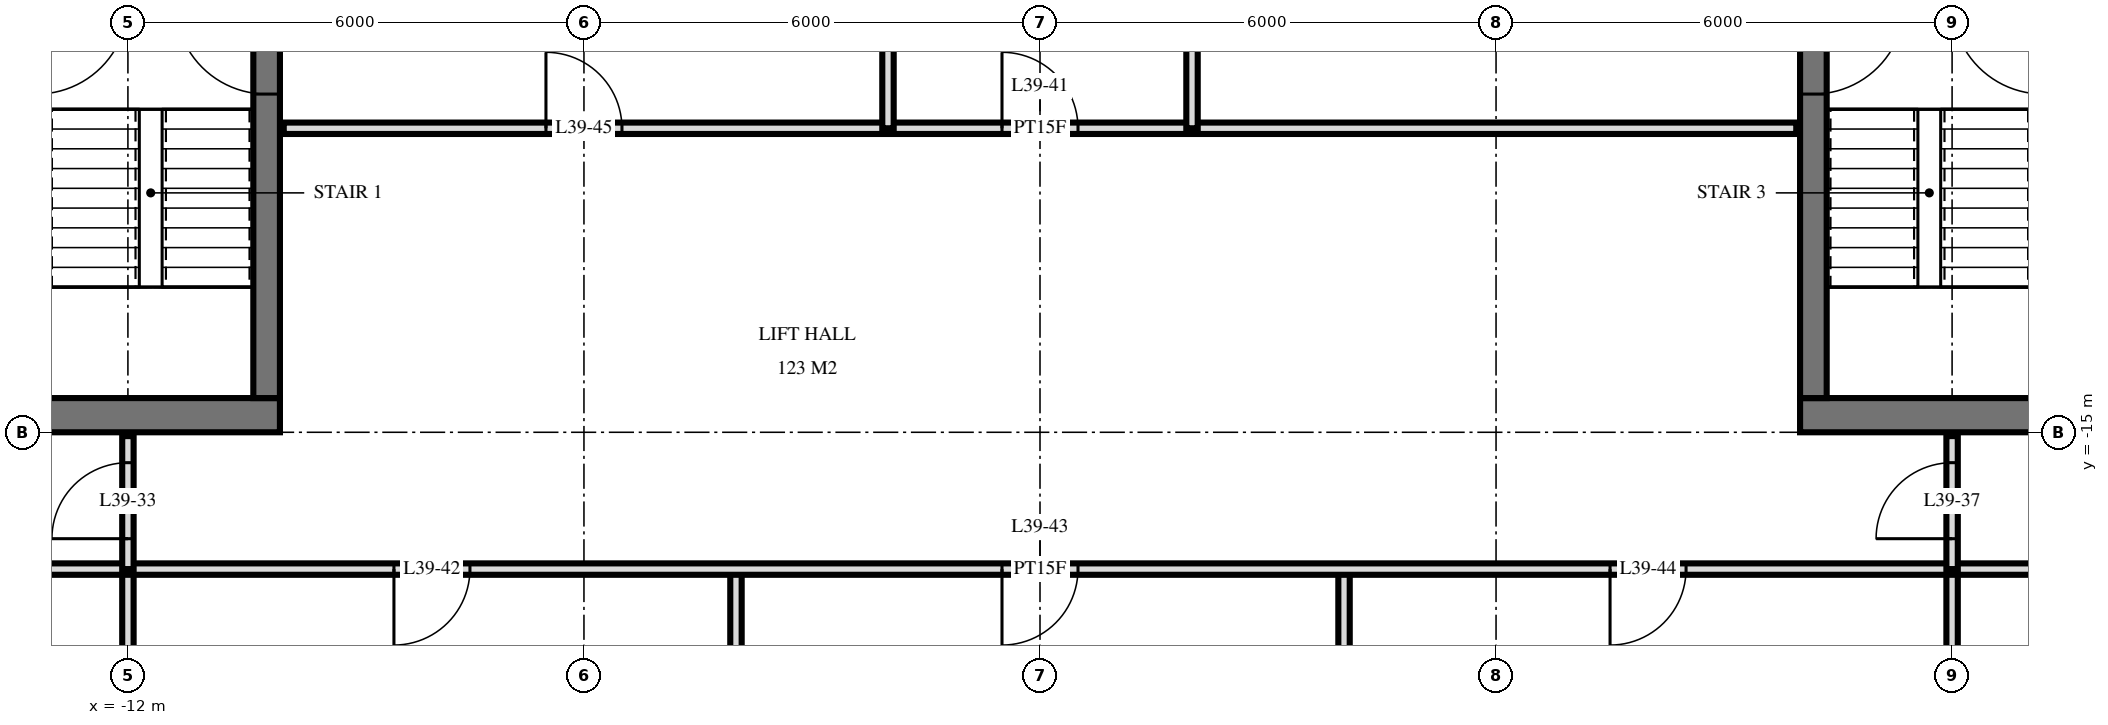
"""IFC4 building model, lengths in metres.
Left out: names, types, materials, properties, quantities, classifications, styles, units other than length and angle.
Written with IfcOpenShell. Run it as: python <this file> out.ifc"""

import sys

from ifc_helpers import new_model, si_unit, direction, frame, frame_2d, origin, place, context, subcontext, project, spatial, rectangle, extrude, element, fill, save


model = new_model("IFC4")
c1 = context("Model", 3, precision=1e-05, world=origin(), true_north=direction((0.0, 1.0)))
c2 = subcontext(c1, "Body", "Model", "MODEL_VIEW")
j1 = project(units=[si_unit("LENGTHUNIT", "METRE"), si_unit("PLANEANGLEUNIT", "RADIAN")], contexts=[c1])
p1 = place(None, origin())
s1 = spatial("IfcSite", under=j1, at=p1, CompositionType="ELEMENT")
p2 = place(p1, origin())
s2 = spatial("IfcBuilding", under=s1, at=p2, CompositionType="ELEMENT")
p3 = place(p2, frame((0.0, 0.0, 152.4)))
s3 = spatial("IfcBuildingStorey", under=s2, at=p3, CompositionType="ELEMENT", Elevation=152.4)
p4 = place(p3, frame((-24.5, -14.775, 0.0), z_axis=(0.0, 0.0, 1.0), x_axis=(1.0, 0.0, 0.0)))
e1 = element("IfcWall", 1, at=p4, inside=s3, PredefinedType="SHEAR", context=c2, shape_type="SweptSolid", body=[
    extrude(rectangle(XDim=14.5, YDim=0.45, at=frame_2d((7.25, 0.0))), origin(), (0.0, 0.0, 1.0), 3.6),
])
p5 = place(p4, frame((6.2, 0.0, 0.0)))
e2 = element("IfcOpeningElement", 2, at=p5, cuts=e1, PredefinedType="OPENING", context=c2, shape_type="SweptSolid", body=[
    extrude(rectangle(XDim=1.2, YDim=2.1, at=frame_2d((0.6, 1.05))), frame((0.0, 0.235, 0.0), z_axis=(0.0, -1.0, 0.0), x_axis=(1.0, 0.0, 0.0)), (0.0, 0.0, 1.0), 0.47),
])
p6 = place(p4, frame((9.25, 0.0, 0.0)))
e3 = element("IfcOpeningElement", 3, at=p6, cuts=e1, PredefinedType="OPENING", context=c2, shape_type="SweptSolid", body=[
    extrude(rectangle(XDim=1.1, YDim=2.1, at=frame_2d((0.55, 1.05))), frame((0.0, 0.235, 0.0), z_axis=(0.0, -1.0, 0.0), x_axis=(1.0, 0.0, 0.0)), (0.0, 0.0, 1.0), 0.47),
])
p7 = place(p4, frame((3.5, 0.0, 0.0)))
e4 = element("IfcOpeningElement", 4, at=p7, cuts=e1, PredefinedType="OPENING", context=c2, shape_type="SweptSolid", body=[
    extrude(rectangle(XDim=0.9, YDim=2.1, at=frame_2d((0.45, 1.05))), frame((0.0, 0.235, 0.0), z_axis=(0.0, -1.0, 0.0), x_axis=(1.0, 0.0, 0.0)), (0.0, 0.0, 1.0), 0.47),
])
p8 = place(p4, frame((1.05, 0.0, 0.0)))
e5 = element("IfcOpeningElement", 5, at=p8, cuts=e1, PredefinedType="OPENING", context=c2, shape_type="SweptSolid", body=[
    extrude(rectangle(XDim=1.0, YDim=2.1, at=frame_2d((0.5, 1.05))), frame((0.0, 0.235, 0.0), z_axis=(0.0, -1.0, 0.0), x_axis=(1.0, 0.0, 0.0)), (0.0, 0.0, 1.0), 0.47),
])
p9 = place(p3, frame((-10.175, -14.55, 0.0), z_axis=(0.0, 0.0, 1.0), x_axis=(0.0, 1.0, 0.0)))
e6 = element("IfcWall", 6, at=p9, inside=s3, PredefinedType="SHEAR", context=c2, shape_type="SweptSolid", body=[
    extrude(rectangle(XDim=14.1, YDim=0.35, at=frame_2d((7.05, 0.0))), origin(), (0.0, 0.0, 1.0), 3.6),
])
p10 = place(p9, frame((8.4, 0.0, 0.0)))
e7 = element("IfcOpeningElement", 7, at=p10, cuts=e6, PredefinedType="OPENING", context=c2, shape_type="SweptSolid", body=[
    extrude(rectangle(XDim=1.4, YDim=2.4, at=frame_2d((0.7, 1.2))), frame((0.0, 0.185, 0.0), z_axis=(0.0, -1.0, 0.0), x_axis=(1.0, 0.0, 0.0)), (0.0, 0.0, 1.0), 0.37),
])
p11 = place(p9, frame((10.0, 0.0, 0.0)))
e8 = element("IfcOpeningElement", 8, at=p11, cuts=e6, PredefinedType="OPENING", context=c2, shape_type="SweptSolid", body=[
    extrude(rectangle(XDim=1.4, YDim=2.4, at=frame_2d((0.7, 1.2))), frame((0.0, 0.185, 0.0), z_axis=(0.0, -1.0, 0.0), x_axis=(1.0, 0.0, 0.0)), (0.0, 0.0, 1.0), 0.37),
])
p12 = place(p9, frame((4.0, 0.0, 0.0)))
e9 = element("IfcOpeningElement", 9, at=p12, cuts=e6, PredefinedType="OPENING", context=c2, shape_type="SweptSolid", body=[
    extrude(rectangle(XDim=1.2, YDim=2.1, at=frame_2d((0.6, 1.05))), frame((0.0, 0.185, 0.0), z_axis=(0.0, -1.0, 0.0), x_axis=(1.0, 0.0, 0.0)), (0.0, 0.0, 1.0), 0.37),
])
p13 = place(p3, frame((10.0, -14.775, 0.0), z_axis=(0.0, 0.0, 1.0), x_axis=(1.0, 0.0, 0.0)))
e10 = element("IfcWall", 10, at=p13, inside=s3, PredefinedType="SHEAR", context=c2, shape_type="SweptSolid", body=[
    extrude(rectangle(XDim=14.5, YDim=0.45, at=frame_2d((7.25, 0.0))), origin(), (0.0, 0.0, 1.0), 3.6),
])
p14 = place(p13, frame((7.1, 0.0, 0.0)))
e11 = element("IfcOpeningElement", 11, at=p14, cuts=e10, PredefinedType="OPENING", context=c2, shape_type="SweptSolid", body=[
    extrude(rectangle(XDim=1.2, YDim=2.1, at=frame_2d((0.6, 1.05))), frame((0.0, 0.235, 0.0), z_axis=(0.0, -1.0, 0.0), x_axis=(1.0, 0.0, 0.0)), (0.0, 0.0, 1.0), 0.47),
])
p15 = place(p13, frame((4.15, 0.0, 0.0)))
e12 = element("IfcOpeningElement", 12, at=p15, cuts=e10, PredefinedType="OPENING", context=c2, shape_type="SweptSolid", body=[
    extrude(rectangle(XDim=1.1, YDim=2.1, at=frame_2d((0.55, 1.05))), frame((0.0, 0.235, 0.0), z_axis=(0.0, -1.0, 0.0), x_axis=(1.0, 0.0, 0.0)), (0.0, 0.0, 1.0), 0.47),
])
p16 = place(p13, frame((10.1, 0.0, 0.0)))
e13 = element("IfcOpeningElement", 13, at=p16, cuts=e10, PredefinedType="OPENING", context=c2, shape_type="SweptSolid", body=[
    extrude(rectangle(XDim=0.9, YDim=2.1, at=frame_2d((0.45, 1.05))), frame((0.0, 0.235, 0.0), z_axis=(0.0, -1.0, 0.0), x_axis=(1.0, 0.0, 0.0)), (0.0, 0.0, 1.0), 0.47),
])
p17 = place(p13, frame((12.45, 0.0, 0.0)))
e14 = element("IfcOpeningElement", 14, at=p17, cuts=e10, PredefinedType="OPENING", context=c2, shape_type="SweptSolid", body=[
    extrude(rectangle(XDim=1.0, YDim=2.1, at=frame_2d((0.5, 1.05))), frame((0.0, 0.235, 0.0), z_axis=(0.0, -1.0, 0.0), x_axis=(1.0, 0.0, 0.0)), (0.0, 0.0, 1.0), 0.47),
])
p18 = place(p3, frame((10.175, -14.55, 0.0), z_axis=(0.0, 0.0, 1.0), x_axis=(0.0, 1.0, 0.0)))
e15 = element("IfcWall", 15, at=p18, inside=s3, PredefinedType="SHEAR", context=c2, shape_type="SweptSolid", body=[
    extrude(rectangle(XDim=14.1, YDim=0.35, at=frame_2d((7.05, 0.0))), origin(), (0.0, 0.0, 1.0), 3.6),
])
p19 = place(p18, frame((8.4, 0.0, 0.0)))
e16 = element("IfcOpeningElement", 16, at=p19, cuts=e15, PredefinedType="OPENING", context=c2, shape_type="SweptSolid", body=[
    extrude(rectangle(XDim=1.4, YDim=2.4, at=frame_2d((0.7, 1.2))), frame((0.0, 0.185, 0.0), z_axis=(0.0, -1.0, 0.0), x_axis=(1.0, 0.0, 0.0)), (0.0, 0.0, 1.0), 0.37),
])
p20 = place(p18, frame((10.0, 0.0, 0.0)))
e17 = element("IfcOpeningElement", 17, at=p20, cuts=e15, PredefinedType="OPENING", context=c2, shape_type="SweptSolid", body=[
    extrude(rectangle(XDim=1.4, YDim=2.4, at=frame_2d((0.7, 1.2))), frame((0.0, 0.185, 0.0), z_axis=(0.0, -1.0, 0.0), x_axis=(1.0, 0.0, 0.0)), (0.0, 0.0, 1.0), 0.37),
])
p21 = place(p18, frame((4.0, 0.0, 0.0)))
e18 = element("IfcOpeningElement", 18, at=p21, cuts=e15, PredefinedType="OPENING", context=c2, shape_type="SweptSolid", body=[
    extrude(rectangle(XDim=1.2, YDim=2.1, at=frame_2d((0.6, 1.05))), frame((0.0, 0.185, 0.0), z_axis=(0.0, -1.0, 0.0), x_axis=(1.0, 0.0, 0.0)), (0.0, 0.0, 1.0), 0.37),
])
p22 = place(p3, frame((12.0, -16.8, 0.0), z_axis=(0.0, 0.0, 1.0), x_axis=(0.0, 1.0, 0.0)))
e19 = element("IfcWall", 19, at=p22, inside=s3, PredefinedType="PARTITIONING", context=c2, shape_type="SweptSolid", body=[
    extrude(rectangle(XDim=1.75, YDim=0.15, at=frame_2d((0.875, 0.0))), origin(), (0.0, 0.0, 1.0), 3.32),
])
p23 = place(p22, frame((0.4, 0.0, 0.0)))
e20 = element("IfcOpeningElement", 20, at=p23, cuts=e19, PredefinedType="OPENING", context=c2, shape_type="SweptSolid", body=[
    extrude(rectangle(XDim=1.0, YDim=2.1, at=frame_2d((0.5, 1.05))), frame((0.0, 0.085, 0.0), z_axis=(0.0, -1.0, 0.0), x_axis=(1.0, 0.0, 0.0)), (0.0, 0.0, 1.0), 0.17),
])
for number, where, z_axis, x_axis in (
    (21, (12.0, -33.62, 0.0), (0.0, 0.0, 1.0), (0.0, 1.0, 0.0)),
    (22, (4.0, -33.62, 0.0), (0.0, 0.0, 1.0), (0.0, 1.0, 0.0)),
):
    element("IfcWall", number, at=place(p3, frame(where, z_axis=z_axis, x_axis=x_axis)), inside=s3, PredefinedType="PARTITIONING", context=c2, shape_type="SweptSolid", body=[
        extrude(rectangle(XDim=16.82, YDim=0.15, at=frame_2d((8.41, 0.0))), origin(), (0.0, 0.0, 1.0), 3.32),
    ])
for number, where, z_axis, x_axis in (
    (23, (2.0, -11.0, 0.0), (0.0, 0.0, 1.0), (0.0, 1.0, 0.0)),
    (24, (-2.0, -11.0, 0.0), (0.0, 0.0, 1.0), (0.0, 1.0, 0.0)),
):
    element("IfcWall", number, at=place(p3, frame(where, z_axis=z_axis, x_axis=x_axis)), inside=s3, PredefinedType="PARTITIONING", context=c2, shape_type="SweptSolid", body=[
        extrude(rectangle(XDim=4.0, YDim=0.15, at=frame_2d((2.0, 0.0))), origin(), (0.0, 0.0, 1.0), 3.32),
    ])
p24 = place(p3, frame((-4.0, -33.62, 0.0), z_axis=(0.0, 0.0, 1.0), x_axis=(0.0, 1.0, 0.0)))
e25 = element("IfcWall", 25, at=p24, inside=s3, PredefinedType="PARTITIONING", context=c2, shape_type="SweptSolid", body=[
    extrude(rectangle(XDim=16.82, YDim=0.15, at=frame_2d((8.41, 0.0))), origin(), (0.0, 0.0, 1.0), 3.32),
])
p25 = place(p3, frame((-12.0, -16.8, 0.0), z_axis=(0.0, 0.0, 1.0), x_axis=(0.0, 1.0, 0.0)))
e26 = element("IfcWall", 26, at=p25, inside=s3, PredefinedType="PARTITIONING", context=c2, shape_type="SweptSolid", body=[
    extrude(rectangle(XDim=1.75, YDim=0.15, at=frame_2d((0.875, 0.0))), origin(), (0.0, 0.0, 1.0), 3.32),
])
p26 = place(p25, frame((0.4, 0.0, 0.0)))
e27 = element("IfcOpeningElement", 27, at=p26, cuts=e26, PredefinedType="OPENING", context=c2, shape_type="SweptSolid", body=[
    extrude(rectangle(XDim=1.0, YDim=2.1, at=frame_2d((0.5, 1.05))), frame((0.0, 0.085, 0.0), z_axis=(0.0, -1.0, 0.0), x_axis=(1.0, 0.0, 0.0)), (0.0, 0.0, 1.0), 0.17),
])
p27 = place(p3, frame((-12.0, -33.62, 0.0), z_axis=(0.0, 0.0, 1.0), x_axis=(0.0, 1.0, 0.0)))
e28 = element("IfcWall", 28, at=p27, inside=s3, PredefinedType="PARTITIONING", context=c2, shape_type="SweptSolid", body=[
    extrude(rectangle(XDim=16.82, YDim=0.15, at=frame_2d((8.41, 0.0))), origin(), (0.0, 0.0, 1.0), 3.32),
])
p28 = place(p3, frame((-28.02, -16.8, 0.0), z_axis=(0.0, 0.0, 1.0), x_axis=(1.0, 0.0, 0.0)))
e29 = element("IfcWall", 29, at=p28, inside=s3, PredefinedType="PARTITIONING", context=c2, shape_type="SweptSolid", body=[
    extrude(rectangle(XDim=56.04, YDim=0.15, at=frame_2d((28.02, 0.0))), origin(), (0.0, 0.0, 1.0), 3.32),
])
p29 = place(p28, frame((13.17, 0.0, 0.0)))
e30 = element("IfcOpeningElement", 30, at=p29, cuts=e29, PredefinedType="OPENING", context=c2, shape_type="SweptSolid", body=[
    extrude(rectangle(XDim=1.0, YDim=2.1, at=frame_2d((0.5, 1.05))), frame((0.0, 0.085, 0.0), z_axis=(0.0, -1.0, 0.0), x_axis=(1.0, 0.0, 0.0)), (0.0, 0.0, 1.0), 0.17),
])
p30 = place(p28, frame((11.32, 0.0, 0.0)))
e31 = element("IfcOpeningElement", 31, at=p30, cuts=e29, PredefinedType="OPENING", context=c2, shape_type="SweptSolid", body=[
    extrude(rectangle(XDim=1.0, YDim=2.1, at=frame_2d((0.5, 1.05))), frame((0.0, 0.085, 0.0), z_axis=(0.0, -1.0, 0.0), x_axis=(1.0, 0.0, 0.0)), (0.0, 0.0, 1.0), 0.17),
])
p31 = place(p28, frame((41.87, 0.0, 0.0)))
e32 = element("IfcOpeningElement", 32, at=p31, cuts=e29, PredefinedType="OPENING", context=c2, shape_type="SweptSolid", body=[
    extrude(rectangle(XDim=1.0, YDim=2.1, at=frame_2d((0.5, 1.05))), frame((0.0, 0.085, 0.0), z_axis=(0.0, -1.0, 0.0), x_axis=(1.0, 0.0, 0.0)), (0.0, 0.0, 1.0), 0.17),
])
p32 = place(p28, frame((43.72, 0.0, 0.0)))
e33 = element("IfcOpeningElement", 33, at=p32, cuts=e29, PredefinedType="OPENING", context=c2, shape_type="SweptSolid", body=[
    extrude(rectangle(XDim=1.0, YDim=2.1, at=frame_2d((0.5, 1.05))), frame((0.0, 0.085, 0.0), z_axis=(0.0, -1.0, 0.0), x_axis=(1.0, 0.0, 0.0)), (0.0, 0.0, 1.0), 0.17),
])
p33 = place(p28, frame((19.52, 0.0, 0.0)))
e34 = element("IfcOpeningElement", 34, at=p33, cuts=e29, PredefinedType="OPENING", context=c2, shape_type="SweptSolid", body=[
    extrude(rectangle(XDim=1.0, YDim=2.1, at=frame_2d((0.5, 1.05))), frame((0.0, 0.085, 0.0), z_axis=(0.0, -1.0, 0.0), x_axis=(1.0, 0.0, 0.0)), (0.0, 0.0, 1.0), 0.17),
])
p34 = place(p28, frame((27.52, 0.0, 0.0)))
e35 = element("IfcOpeningElement", 35, at=p34, cuts=e29, PredefinedType="OPENING", context=c2, shape_type="SweptSolid", body=[
    extrude(rectangle(XDim=1.0, YDim=2.1, at=frame_2d((0.5, 1.05))), frame((0.0, 0.085, 0.0), z_axis=(0.0, -1.0, 0.0), x_axis=(1.0, 0.0, 0.0)), (0.0, 0.0, 1.0), 0.17),
])
p35 = place(p28, frame((35.52, 0.0, 0.0)))
e36 = element("IfcOpeningElement", 36, at=p35, cuts=e29, PredefinedType="OPENING", context=c2, shape_type="SweptSolid", body=[
    extrude(rectangle(XDim=1.0, YDim=2.1, at=frame_2d((0.5, 1.05))), frame((0.0, 0.085, 0.0), z_axis=(0.0, -1.0, 0.0), x_axis=(1.0, 0.0, 0.0)), (0.0, 0.0, 1.0), 0.17),
])
p36 = place(p3, frame((-9.95, -11.0, 0.0), z_axis=(0.0, 0.0, 1.0), x_axis=(1.0, 0.0, 0.0)))
e37 = element("IfcWall", 37, at=p36, inside=s3, PredefinedType="PARTITIONING", context=c2, shape_type="SweptSolid", body=[
    extrude(rectangle(XDim=19.9, YDim=0.15, at=frame_2d((9.95, 0.0))), origin(), (0.0, 0.0, 1.0), 3.32),
])
p37 = place(p36, frame((9.45, 0.0, 0.0)))
e38 = element("IfcOpeningElement", 38, at=p37, cuts=e37, PredefinedType="OPENING", context=c2, shape_type="SweptSolid", body=[
    extrude(rectangle(XDim=1.0, YDim=2.1, at=frame_2d((0.5, 1.05))), frame((0.0, 0.085, 0.0), z_axis=(0.0, -1.0, 0.0), x_axis=(1.0, 0.0, 0.0)), (0.0, 0.0, 1.0), 0.17),
])
p38 = place(p36, frame((3.45, 0.0, 0.0)))
e39 = element("IfcOpeningElement", 39, at=p38, cuts=e37, PredefinedType="OPENING", context=c2, shape_type="SweptSolid", body=[
    extrude(rectangle(XDim=1.0, YDim=2.1, at=frame_2d((0.5, 1.05))), frame((0.0, 0.085, 0.0), z_axis=(0.0, -1.0, 0.0), x_axis=(1.0, 0.0, 0.0)), (0.0, 0.0, 1.0), 0.17),
])
p39 = place(p12, origin())
e40 = element("IfcDoor", 40, at=p39, inside=s3, OperationType="SINGLE_SWING_LEFT", PredefinedType="DOOR", context=c2, shape_type="SweptSolid", body=[
    extrude(rectangle(XDim=1.2, YDim=2.1, at=frame_2d((0.6, 1.05))), frame((0.0, 0.025, 0.0), z_axis=(0.0, -1.0, 0.0), x_axis=(1.0, 0.0, 0.0)), (0.0, 0.0, 1.0), 0.05),
])
fill(e9, e40)
p40 = place(p21, frame((0.6, 0.0, 0.0), z_axis=(0.0, 0.0, 1.0), x_axis=(-1.0, 0.0, 0.0)))
e41 = element("IfcDoor", 41, at=p40, inside=s3, OperationType="SINGLE_SWING_RIGHT", PredefinedType="DOOR", context=c2, shape_type="SweptSolid", body=[
    extrude(rectangle(XDim=1.2, YDim=2.1, at=frame_2d((0.0, 1.05))), frame((0.0, -0.025, 0.0), z_axis=(0.0, 1.0, 0.0), x_axis=(-1.0, 0.0, 0.0)), (0.0, 0.0, 1.0), 0.05),
])
fill(e18, e41)
p41 = place(p26, origin())
e42 = element("IfcDoor", 42, at=p41, inside=s3, OperationType="SINGLE_SWING_RIGHT", PredefinedType="DOOR", context=c2, shape_type="SweptSolid", body=[
    extrude(rectangle(XDim=1.0, YDim=2.1, at=frame_2d((0.5, 1.05))), frame((0.0, 0.025, 0.0), z_axis=(0.0, -1.0, 0.0), x_axis=(1.0, 0.0, 0.0)), (0.0, 0.0, 1.0), 0.05),
])
fill(e27, e42)
p42 = place(p23, origin())
e43 = element("IfcDoor", 43, at=p42, inside=s3, OperationType="SINGLE_SWING_RIGHT", PredefinedType="DOOR", context=c2, shape_type="SweptSolid", body=[
    extrude(rectangle(XDim=1.0, YDim=2.1, at=frame_2d((0.5, 1.05))), frame((0.0, 0.025, 0.0), z_axis=(0.0, -1.0, 0.0), x_axis=(1.0, 0.0, 0.0)), (0.0, 0.0, 1.0), 0.05),
])
fill(e20, e43)
p43 = place(p37, origin())
e44 = element("IfcDoor", 44, at=p43, inside=s3, OperationType="SINGLE_SWING_RIGHT", PredefinedType="DOOR", context=c2, shape_type="SweptSolid", body=[
    extrude(rectangle(XDim=1.0, YDim=2.1, at=frame_2d((0.5, 1.05))), frame((0.0, 0.025, 0.0), z_axis=(0.0, -1.0, 0.0), x_axis=(1.0, 0.0, 0.0)), (0.0, 0.0, 1.0), 0.05),
])
fill(e38, e44)
p44 = place(p33, frame((0.5, 0.0, 0.0), z_axis=(0.0, 0.0, 1.0), x_axis=(-1.0, 0.0, 0.0)))
e45 = element("IfcDoor", 45, at=p44, inside=s3, OperationType="SINGLE_SWING_LEFT", PredefinedType="DOOR", context=c2, shape_type="SweptSolid", body=[
    extrude(rectangle(XDim=1.0, YDim=2.1, at=frame_2d((0.0, 1.05))), frame((0.0, -0.025, 0.0), z_axis=(0.0, 1.0, 0.0), x_axis=(-1.0, 0.0, 0.0)), (0.0, 0.0, 1.0), 0.05),
])
fill(e34, e45)
p45 = place(p34, frame((0.5, 0.0, 0.0), z_axis=(0.0, 0.0, 1.0), x_axis=(-1.0, 0.0, 0.0)))
e46 = element("IfcDoor", 46, at=p45, inside=s3, OperationType="SINGLE_SWING_LEFT", PredefinedType="DOOR", context=c2, shape_type="SweptSolid", body=[
    extrude(rectangle(XDim=1.0, YDim=2.1, at=frame_2d((0.0, 1.05))), frame((0.0, -0.025, 0.0), z_axis=(0.0, 1.0, 0.0), x_axis=(-1.0, 0.0, 0.0)), (0.0, 0.0, 1.0), 0.05),
])
fill(e35, e46)
p46 = place(p35, frame((0.5, 0.0, 0.0), z_axis=(0.0, 0.0, 1.0), x_axis=(-1.0, 0.0, 0.0)))
e47 = element("IfcDoor", 47, at=p46, inside=s3, OperationType="SINGLE_SWING_LEFT", PredefinedType="DOOR", context=c2, shape_type="SweptSolid", body=[
    extrude(rectangle(XDim=1.0, YDim=2.1, at=frame_2d((0.0, 1.05))), frame((0.0, -0.025, 0.0), z_axis=(0.0, 1.0, 0.0), x_axis=(-1.0, 0.0, 0.0)), (0.0, 0.0, 1.0), 0.05),
])
fill(e36, e47)
p47 = place(p38, origin())
e48 = element("IfcDoor", 48, at=p47, inside=s3, OperationType="SINGLE_SWING_RIGHT", PredefinedType="DOOR", context=c2, shape_type="SweptSolid", body=[
    extrude(rectangle(XDim=1.0, YDim=2.1, at=frame_2d((0.5, 1.05))), frame((0.0, 0.025, 0.0), z_axis=(0.0, -1.0, 0.0), x_axis=(1.0, 0.0, 0.0)), (0.0, 0.0, 1.0), 0.05),
])
fill(e39, e48)
save(model, sys.argv[1])
